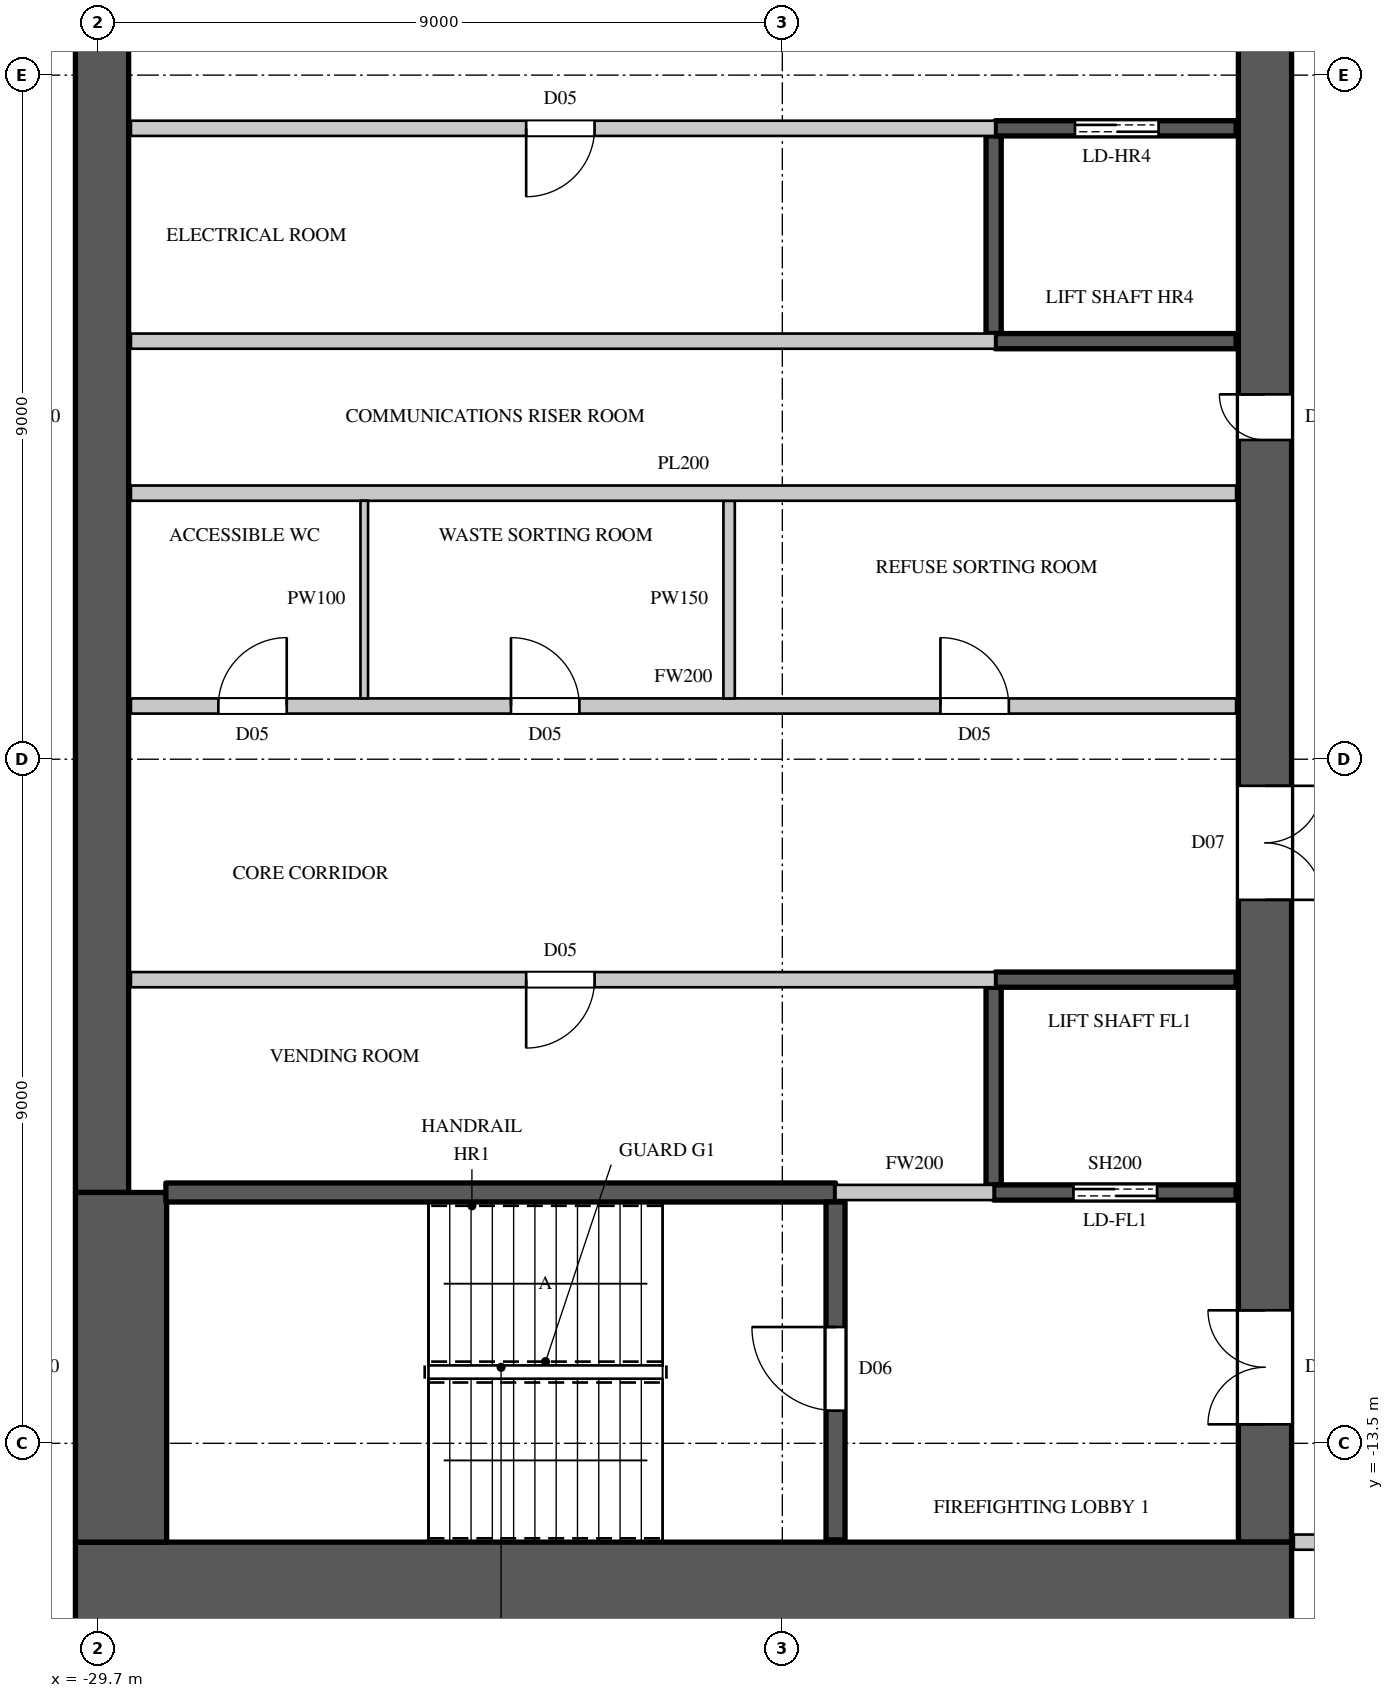
"""IFC4 building model, lengths in metres.
Left out: names, types, materials, properties, quantities, classifications, styles, units other than length and angle.
Written with IfcOpenShell. Run it as: python <this file> out.ifc"""

import sys

from ifc_helpers import new_model, si_unit, direction, frame, frame_2d, origin, place, context, subcontext, project, spatial, rectangle, extrude, element, fill, save


model = new_model("IFC4")
c1 = context("Model", 3, precision=1e-05, world=origin(), true_north=direction((0.0, 1.0)))
c2 = subcontext(c1, "Body", "Model", "MODEL_VIEW")
j1 = project(units=[si_unit("LENGTHUNIT", "METRE"), si_unit("PLANEANGLEUNIT", "RADIAN")], contexts=[c1])
p1 = place(None, origin())
s1 = spatial("IfcSite", under=j1, at=p1, CompositionType="ELEMENT")
p2 = place(p1, origin())
s2 = spatial("IfcBuilding", under=s1, at=p2, CompositionType="ELEMENT")
p3 = place(p2, frame((0.0, 0.0, 284.4)))
s3 = spatial("IfcBuildingStorey", under=s2, at=p3, CompositionType="ELEMENT", Elevation=284.4)
p4 = place(p3, frame((-30.0, -15.4, 0.0), z_axis=(0.0, 0.0, 1.0), x_axis=(1.0, 0.0, 0.0)))
e1 = element("IfcWall", 1, at=p4, inside=s3, PredefinedType="SHEAR", context=c2, shape_type="SweptSolid", body=[
    extrude(rectangle(XDim=16.0, YDim=1.2, at=frame_2d((8.0, 0.0))), origin(), (0.0, 0.0, 1.0), 4.1),
])
p5 = place(p3, frame((-14.35, -14.8, 0.0), z_axis=(0.0, 0.0, 1.0), x_axis=(0.0, 1.0, 0.0)))
e2 = element("IfcWall", 2, at=p5, inside=s3, PredefinedType="SHEAR", context=c2, shape_type="SweptSolid", body=[
    extrude(rectangle(XDim=29.6, YDim=0.7, at=frame_2d((14.8, 0.0))), origin(), (0.0, 0.0, 1.0), 4.1),
])
p6 = place(p5, frame((1.55, 0.0, 0.0)))
e3 = element("IfcOpeningElement", 3, at=p6, cuts=e2, PredefinedType="OPENING", context=c2, shape_type="SweptSolid", body=[
    extrude(rectangle(XDim=1.5, YDim=2.4, at=frame_2d((0.75, 1.2))), frame((0.0, 0.36, 0.0), z_axis=(0.0, -1.0, 0.0), x_axis=(1.0, 0.0, 0.0)), (0.0, 0.0, 1.0), 0.72),
])
p7 = place(p5, frame((26.55, 0.0, 0.0)))
e4 = element("IfcOpeningElement", 4, at=p7, cuts=e2, PredefinedType="OPENING", context=c2, shape_type="SweptSolid", body=[
    extrude(rectangle(XDim=1.5, YDim=2.4, at=frame_2d((0.75, 1.2))), frame((0.0, 0.36, 0.0), z_axis=(0.0, -1.0, 0.0), x_axis=(1.0, 0.0, 0.0)), (0.0, 0.0, 1.0), 0.72),
])
p8 = place(p5, frame((8.45, 0.0, 0.0)))
e5 = element("IfcOpeningElement", 5, at=p8, cuts=e2, PredefinedType="OPENING", context=c2, shape_type="SweptSolid", body=[
    extrude(rectangle(XDim=1.5, YDim=2.4, at=frame_2d((0.75, 1.2))), frame((0.0, 0.36, 0.0), z_axis=(0.0, -1.0, 0.0), x_axis=(1.0, 0.0, 0.0)), (0.0, 0.0, 1.0), 0.72),
])
p9 = place(p5, frame((19.65, 0.0, 0.0)))
e6 = element("IfcOpeningElement", 6, at=p9, cuts=e2, PredefinedType="OPENING", context=c2, shape_type="SweptSolid", body=[
    extrude(rectangle(XDim=1.5, YDim=2.4, at=frame_2d((0.75, 1.2))), frame((0.0, 0.36, 0.0), z_axis=(0.0, -1.0, 0.0), x_axis=(1.0, 0.0, 0.0)), (0.0, 0.0, 1.0), 0.72),
])
p10 = place(p5, frame((14.5, 0.0, 0.0)))
e7 = element("IfcOpeningElement", 7, at=p10, cuts=e2, PredefinedType="OPENING", context=c2, shape_type="SweptSolid", body=[
    extrude(rectangle(XDim=0.6, YDim=2.0, at=frame_2d((0.3, 1.0))), frame((0.0, 0.36, 0.0), z_axis=(0.0, -1.0, 0.0), x_axis=(1.0, 0.0, 0.0)), (0.0, 0.0, 1.0), 0.72),
])
p11 = place(p3, frame((-29.65, -10.2, 0.0), z_axis=(0.0, 0.0, 1.0), x_axis=(0.0, 1.0, 0.0)))
e8 = element("IfcWall", 8, at=p11, inside=s3, PredefinedType="SHEAR", context=c2, shape_type="SweptSolid", body=[
    extrude(rectangle(XDim=20.4, YDim=0.7, at=frame_2d((10.2, 0.0))), origin(), (0.0, 0.0, 1.0), 4.1),
])
p12 = place(p3, frame((-29.4, -14.8, 0.0), z_axis=(0.0, 0.0, 1.0), x_axis=(0.0, 1.0, 0.0)))
e9 = element("IfcWall", 9, at=p12, inside=s3, PredefinedType="SHEAR", context=c2, shape_type="SweptSolid", body=[
    extrude(rectangle(XDim=4.6, YDim=1.2, at=frame_2d((2.3, 0.0))), origin(), (0.0, 0.0, 1.0), 4.1),
])
p13 = place(p3, frame((-29.27, -7.4, 0.0), z_axis=(0.0, 0.0, 1.0), x_axis=(1.0, 0.0, 0.0)))
e10 = element("IfcWall", 10, at=p13, inside=s3, PredefinedType="PARTITIONING", context=c2, shape_type="SweptSolid", body=[
    extrude(rectangle(XDim=11.37, YDim=0.2, at=frame_2d((5.685, 0.0))), origin(), (0.0, 0.0, 1.0), 3.8),
])
p14 = place(p13, frame((5.2, 0.0, 0.0)))
e11 = element("IfcOpeningElement", 11, at=p14, cuts=e10, PredefinedType="OPENING", context=c2, shape_type="SweptSolid", body=[
    extrude(rectangle(XDim=0.9, YDim=2.2, at=frame_2d((0.45, 1.1))), frame((0.0, 0.11, 0.0), z_axis=(0.0, -1.0, 0.0), x_axis=(1.0, 0.0, 0.0)), (0.0, 0.0, 1.0), 0.22),
])
p15 = place(p3, frame((-29.27, -3.8, 0.0), z_axis=(0.0, 0.0, 1.0), x_axis=(1.0, 0.0, 0.0)))
e12 = element("IfcWall", 12, at=p15, inside=s3, PredefinedType="PARTITIONING", context=c2, shape_type="SweptSolid", body=[
    extrude(rectangle(XDim=14.54, YDim=0.2, at=frame_2d((7.27, 0.0))), origin(), (0.0, 0.0, 1.0), 3.8),
])
p16 = place(p15, frame((1.15, 0.0, 0.0)))
e13 = element("IfcOpeningElement", 13, at=p16, cuts=e12, PredefinedType="OPENING", context=c2, shape_type="SweptSolid", body=[
    extrude(rectangle(XDim=0.9, YDim=2.2, at=frame_2d((0.45, 1.1))), frame((0.0, 0.11, 0.0), z_axis=(0.0, -1.0, 0.0), x_axis=(1.0, 0.0, 0.0)), (0.0, 0.0, 1.0), 0.22),
])
p17 = place(p15, frame((5.0, 0.0, 0.0)))
e14 = element("IfcOpeningElement", 14, at=p17, cuts=e12, PredefinedType="OPENING", context=c2, shape_type="SweptSolid", body=[
    extrude(rectangle(XDim=0.9, YDim=2.2, at=frame_2d((0.45, 1.1))), frame((0.0, 0.11, 0.0), z_axis=(0.0, -1.0, 0.0), x_axis=(1.0, 0.0, 0.0)), (0.0, 0.0, 1.0), 0.22),
])
p18 = place(p15, frame((10.65, 0.0, 0.0)))
e15 = element("IfcOpeningElement", 15, at=p18, cuts=e12, PredefinedType="OPENING", context=c2, shape_type="SweptSolid", body=[
    extrude(rectangle(XDim=0.9, YDim=2.2, at=frame_2d((0.45, 1.1))), frame((0.0, 0.11, 0.0), z_axis=(0.0, -1.0, 0.0), x_axis=(1.0, 0.0, 0.0)), (0.0, 0.0, 1.0), 0.22),
])
p19 = place(p3, frame((-20.0, -10.2, 0.0), z_axis=(0.0, 0.0, 1.0), x_axis=(1.0, 0.0, 0.0)))
e16 = element("IfcWall", 16, at=p19, inside=s3, PredefinedType="PARTITIONING", context=c2, shape_type="SweptSolid", body=[
    extrude(rectangle(XDim=2.08, YDim=0.2, at=frame_2d((1.04, 0.0))), origin(), (0.0, 0.0, 1.0), 3.8),
])
p20 = place(p3, frame((-13.97, -14.8, 0.0), z_axis=(0.0, 0.0, 1.0), x_axis=(1.0, 0.0, 0.0)))
e17 = element("IfcWall", 17, at=p20, inside=s3, PredefinedType="PARTITIONING", context=c2, shape_type="SweptSolid", body=[
    extrude(rectangle(XDim=2.87, YDim=0.2, at=frame_2d((1.435, 0.0))), origin(), (0.0, 0.0, 1.0), 3.8),
])
p21 = place(p3, frame((-21.4, -3.7, 0.0), z_axis=(0.0, 0.0, 1.0), x_axis=(0.0, 1.0, 0.0)))
e18 = element("IfcWall", 18, at=p21, inside=s3, PredefinedType="PARTITIONING", context=c2, shape_type="SweptSolid", body=[
    extrude(rectangle(XDim=2.6, YDim=0.15, at=frame_2d((1.3, 0.0))), origin(), (0.0, 0.0, 1.0), 3.8),
])
p22 = place(p3, frame((-29.27, -1.0, 0.0), z_axis=(0.0, 0.0, 1.0), x_axis=(1.0, 0.0, 0.0)))
e19 = element("IfcWall", 19, at=p22, inside=s3, PredefinedType="PARTITIONING", context=c2, shape_type="SweptSolid", body=[
    extrude(rectangle(XDim=14.54, YDim=0.2, at=frame_2d((7.27, 0.0))), origin(), (0.0, 0.0, 1.0), 3.8),
])
p23 = place(p3, frame((-29.27, 1.0, 0.0), z_axis=(0.0, 0.0, 1.0), x_axis=(1.0, 0.0, 0.0)))
e20 = element("IfcWall", 20, at=p23, inside=s3, PredefinedType="PARTITIONING", context=c2, shape_type="SweptSolid", body=[
    extrude(rectangle(XDim=11.37, YDim=0.2, at=frame_2d((5.685, 0.0))), origin(), (0.0, 0.0, 1.0), 3.8),
])
p24 = place(p3, frame((-29.27, 3.8, 0.0), z_axis=(0.0, 0.0, 1.0), x_axis=(1.0, 0.0, 0.0)))
e21 = element("IfcWall", 21, at=p24, inside=s3, PredefinedType="PARTITIONING", context=c2, shape_type="SweptSolid", body=[
    extrude(rectangle(XDim=11.37, YDim=0.2, at=frame_2d((5.685, 0.0))), origin(), (0.0, 0.0, 1.0), 3.8),
])
p25 = place(p24, frame((5.2, 0.0, 0.0)))
e22 = element("IfcOpeningElement", 22, at=p25, cuts=e21, PredefinedType="OPENING", context=c2, shape_type="SweptSolid", body=[
    extrude(rectangle(XDim=0.9, YDim=2.2, at=frame_2d((0.45, 1.1))), frame((0.0, 0.11, 0.0), z_axis=(0.0, -1.0, 0.0), x_axis=(1.0, 0.0, 0.0)), (0.0, 0.0, 1.0), 0.22),
])
p26 = place(p3, frame((-17.92, -10.1, 0.0), z_axis=(0.0, 0.0, 1.0), x_axis=(0.0, 1.0, 0.0)))
e23 = element("IfcWall", 23, at=p26, inside=s3, PredefinedType="SHEAR", context=c2, shape_type="SweptSolid", body=[
    extrude(rectangle(XDim=2.6, YDim=0.2, at=frame_2d((1.3, 0.0))), origin(), (0.0, 0.0, 1.0), 3.8),
])
p27 = place(p3, frame((-17.92, -10.2, 0.0), z_axis=(0.0, 0.0, 1.0), x_axis=(1.0, 0.0, 0.0)))
e24 = element("IfcWall", 24, at=p27, inside=s3, PredefinedType="SHEAR", context=c2, shape_type="SweptSolid", body=[
    extrude(rectangle(XDim=3.19, YDim=0.2, at=frame_2d((1.595, 0.0))), origin(), (0.0, 0.0, 1.0), 3.8),
])
p28 = place(p27, frame((1.05, 0.0, 0.0)))
e25 = element("IfcOpeningElement", 25, at=p28, cuts=e24, PredefinedType="OPENING", context=c2, shape_type="SweptSolid", body=[
    extrude(rectangle(XDim=1.1, YDim=2.2, at=frame_2d((0.55, 1.1))), frame((0.0, 0.11, 0.0), z_axis=(0.0, -1.0, 0.0), x_axis=(1.0, 0.0, 0.0)), (0.0, 0.0, 1.0), 0.22),
])
p29 = place(p3, frame((-17.9, -7.4, 0.0), z_axis=(0.0, 0.0, 1.0), x_axis=(1.0, 0.0, 0.0)))
e26 = element("IfcWall", 26, at=p29, inside=s3, PredefinedType="SHEAR", context=c2, shape_type="SweptSolid", body=[
    extrude(rectangle(XDim=3.17, YDim=0.2, at=frame_2d((1.585, 0.0))), origin(), (0.0, 0.0, 1.0), 3.8),
])
p30 = place(p3, frame((-17.92, 1.1, 0.0), z_axis=(0.0, 0.0, 1.0), x_axis=(0.0, 1.0, 0.0)))
e27 = element("IfcWall", 27, at=p30, inside=s3, PredefinedType="SHEAR", context=c2, shape_type="SweptSolid", body=[
    extrude(rectangle(XDim=2.6, YDim=0.2, at=frame_2d((1.3, 0.0))), origin(), (0.0, 0.0, 1.0), 3.8),
])
p31 = place(p3, frame((-17.9, 1.0, 0.0), z_axis=(0.0, 0.0, 1.0), x_axis=(1.0, 0.0, 0.0)))
e28 = element("IfcWall", 28, at=p31, inside=s3, PredefinedType="SHEAR", context=c2, shape_type="SweptSolid", body=[
    extrude(rectangle(XDim=3.17, YDim=0.2, at=frame_2d((1.585, 0.0))), origin(), (0.0, 0.0, 1.0), 3.8),
])
p32 = place(p3, frame((-17.9, 3.8, 0.0), z_axis=(0.0, 0.0, 1.0), x_axis=(1.0, 0.0, 0.0)))
e29 = element("IfcWall", 29, at=p32, inside=s3, PredefinedType="SHEAR", context=c2, shape_type="SweptSolid", body=[
    extrude(rectangle(XDim=3.17, YDim=0.2, at=frame_2d((1.585, 0.0))), origin(), (0.0, 0.0, 1.0), 3.8),
])
p33 = place(p32, frame((1.05, 0.0, 0.0)))
e30 = element("IfcOpeningElement", 30, at=p33, cuts=e29, PredefinedType="OPENING", context=c2, shape_type="SweptSolid", body=[
    extrude(rectangle(XDim=1.1, YDim=2.2, at=frame_2d((0.55, 1.1))), frame((0.0, 0.11, 0.0), z_axis=(0.0, -1.0, 0.0), x_axis=(1.0, 0.0, 0.0)), (0.0, 0.0, 1.0), 0.22),
])
p34 = place(p3, frame((-28.81, -10.2, 0.0), z_axis=(0.0, 0.0, 1.0), x_axis=(1.0, 0.0, 0.0)))
e31 = element("IfcWall", 31, at=p34, inside=s3, PredefinedType="SHEAR", context=c2, shape_type="SweptSolid", body=[
    extrude(rectangle(XDim=8.81, YDim=0.25, at=frame_2d((4.405, 0.0))), origin(), (0.0, 0.0, 1.0), 3.8),
])
p35 = place(p3, frame((-20.0, -14.77, 0.0), z_axis=(0.0, 0.0, 1.0), x_axis=(0.0, 1.0, 0.0)))
e32 = element("IfcWall", 32, at=p35, inside=s3, PredefinedType="SHEAR", context=c2, shape_type="SweptSolid", body=[
    extrude(rectangle(XDim=4.445, YDim=0.25, at=frame_2d((2.223, 0.0))), origin(), (0.0, 0.0, 1.0), 3.8),
])
p36 = place(p35, frame((1.7, 0.0, 0.0)))
e33 = element("IfcOpeningElement", 33, at=p36, cuts=e32, PredefinedType="OPENING", context=c2, shape_type="SweptSolid", body=[
    extrude(rectangle(XDim=1.1, YDim=2.2, at=frame_2d((0.55, 1.1))), frame((0.0, 0.135, 0.0), z_axis=(0.0, -1.0, 0.0), x_axis=(1.0, 0.0, 0.0)), (0.0, 0.0, 1.0), 0.27),
])
p37 = place(p3, frame((-26.2, -3.7, 0.0), z_axis=(0.0, 0.0, 1.0), x_axis=(0.0, 1.0, 0.0)))
e34 = element("IfcWall", 34, at=p37, inside=s3, PredefinedType="PARTITIONING", context=c2, shape_type="SweptSolid", body=[
    extrude(rectangle(XDim=2.6, YDim=0.1, at=frame_2d((1.3, 0.0))), origin(), (0.0, 0.0, 1.0), 3.8),
])
p38 = place(p36, origin())
e35 = element("IfcDoor", 35, at=p38, inside=s3, OperationType="SINGLE_SWING_RIGHT", PredefinedType="DOOR", context=c2, shape_type="SweptSolid", body=[
    extrude(rectangle(XDim=1.1, YDim=2.2, at=frame_2d((0.55, 1.1))), frame((0.0, 0.025, 0.0), z_axis=(0.0, -1.0, 0.0), x_axis=(1.0, 0.0, 0.0)), (0.0, 0.0, 1.0), 0.05),
])
fill(e33, e35)
p39 = place(p14, origin())
e36 = element("IfcDoor", 36, at=p39, inside=s3, OperationType="SINGLE_SWING_RIGHT", PredefinedType="DOOR", context=c2, shape_type="SweptSolid", body=[
    extrude(rectangle(XDim=0.9, YDim=2.2, at=frame_2d((0.45, 1.1))), frame((0.0, 0.025, 0.0), z_axis=(0.0, -1.0, 0.0), x_axis=(1.0, 0.0, 0.0)), (0.0, 0.0, 1.0), 0.05),
])
fill(e11, e36)
p40 = place(p16, origin())
e37 = element("IfcDoor", 37, at=p40, inside=s3, OperationType="SINGLE_SWING_RIGHT", PredefinedType="DOOR", context=c2, shape_type="SweptSolid", body=[
    extrude(rectangle(XDim=0.9, YDim=2.2, at=frame_2d((0.45, 1.1))), frame((0.0, 0.025, 0.0), z_axis=(0.0, -1.0, 0.0), x_axis=(1.0, 0.0, 0.0)), (0.0, 0.0, 1.0), 0.05),
])
fill(e13, e37)
p41 = place(p17, origin())
e38 = element("IfcDoor", 38, at=p41, inside=s3, OperationType="SINGLE_SWING_LEFT", PredefinedType="DOOR", context=c2, shape_type="SweptSolid", body=[
    extrude(rectangle(XDim=0.9, YDim=2.2, at=frame_2d((0.45, 1.1))), frame((0.0, 0.025, 0.0), z_axis=(0.0, -1.0, 0.0), x_axis=(1.0, 0.0, 0.0)), (0.0, 0.0, 1.0), 0.05),
])
fill(e14, e38)
p42 = place(p18, origin())
e39 = element("IfcDoor", 39, at=p42, inside=s3, OperationType="SINGLE_SWING_LEFT", PredefinedType="DOOR", context=c2, shape_type="SweptSolid", body=[
    extrude(rectangle(XDim=0.9, YDim=2.2, at=frame_2d((0.45, 1.1))), frame((0.0, 0.025, 0.0), z_axis=(0.0, -1.0, 0.0), x_axis=(1.0, 0.0, 0.0)), (0.0, 0.0, 1.0), 0.05),
])
fill(e15, e39)
p43 = place(p25, origin())
e40 = element("IfcDoor", 40, at=p43, inside=s3, OperationType="SINGLE_SWING_RIGHT", PredefinedType="DOOR", context=c2, shape_type="SweptSolid", body=[
    extrude(rectangle(XDim=0.9, YDim=2.2, at=frame_2d((0.45, 1.1))), frame((0.0, 0.025, 0.0), z_axis=(0.0, -1.0, 0.0), x_axis=(1.0, 0.0, 0.0)), (0.0, 0.0, 1.0), 0.05),
])
fill(e22, e40)
p44 = place(p28, origin())
e41 = element("IfcDoor", 41, at=p44, inside=s3, OperationType="DOUBLE_DOOR_SLIDING", PredefinedType="DOOR", context=c2, shape_type="SweptSolid", body=[
    extrude(rectangle(XDim=1.1, YDim=2.2, at=frame_2d((0.55, 1.1))), frame((0.0, 0.025, 0.0), z_axis=(0.0, -1.0, 0.0), x_axis=(1.0, 0.0, 0.0)), (0.0, 0.0, 1.0), 0.05),
])
fill(e25, e41)
p45 = place(p33, origin())
e42 = element("IfcDoor", 42, at=p45, inside=s3, OperationType="DOUBLE_DOOR_SLIDING", PredefinedType="DOOR", context=c2, shape_type="SweptSolid", body=[
    extrude(rectangle(XDim=1.1, YDim=2.2, at=frame_2d((0.55, 1.1))), frame((0.0, 0.025, 0.0), z_axis=(0.0, -1.0, 0.0), x_axis=(1.0, 0.0, 0.0)), (0.0, 0.0, 1.0), 0.05),
])
fill(e30, e42)
p46 = place(p6, origin())
e43 = element("IfcDoor", 43, at=p46, inside=s3, OperationType="DOUBLE_DOOR_SINGLE_SWING", PredefinedType="DOOR", context=c2, shape_type="SweptSolid", body=[
    extrude(rectangle(XDim=1.5, YDim=2.4, at=frame_2d((0.75, 1.2))), frame((0.0, 0.345, 0.0), z_axis=(0.0, -1.0, 0.0), x_axis=(1.0, 0.0, 0.0)), (0.0, 0.0, 1.0), 0.05),
])
fill(e3, e43)
p47 = place(p8, origin())
e44 = element("IfcDoor", 44, at=p47, inside=s3, OperationType="DOUBLE_DOOR_SINGLE_SWING", PredefinedType="DOOR", context=c2, shape_type="SweptSolid", body=[
    extrude(rectangle(XDim=1.5, YDim=2.4, at=frame_2d((0.75, 1.2))), frame((0.0, -0.295, 0.0), z_axis=(0.0, -1.0, 0.0), x_axis=(1.0, 0.0, 0.0)), (0.0, 0.0, 1.0), 0.05),
])
fill(e5, e44)
p48 = place(p10, origin())
e45 = element("IfcDoor", 45, at=p48, inside=s3, OperationType="SINGLE_SWING_RIGHT", PredefinedType="DOOR", context=c2, shape_type="SweptSolid", body=[
    extrude(rectangle(XDim=0.6, YDim=2.0, at=frame_2d((0.3, 1.0))), frame((0.0, 0.345, 0.0), z_axis=(0.0, -1.0, 0.0), x_axis=(1.0, 0.0, 0.0)), (0.0, 0.0, 1.0), 0.05),
])
fill(e7, e45)
save(model, sys.argv[1])
